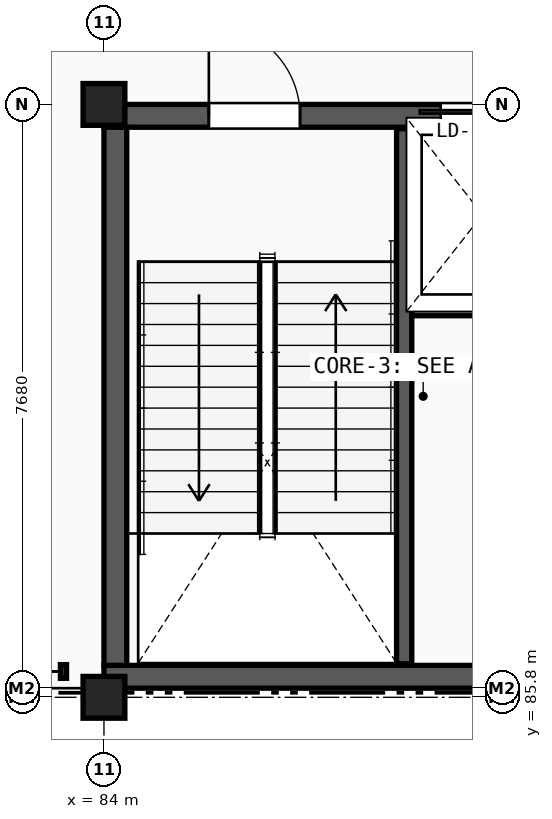
"""IFC4 building model, lengths in metres.
Left out: names, types, materials, properties, quantities, classifications, styles, units other than length and angle.
Written with IfcOpenShell. Run it as: python <this file> out.ifc"""

import sys

from ifc_helpers import new_model, si_unit, direction, frame, frame_2d, origin, origin_2d, place, context, subcontext, project, spatial, rectangle, circle, extrude, element, fill, save


model = new_model("IFC4")
c1 = context("Model", 3, precision=1e-05, world=origin(), true_north=direction((0.0, 1.0)))
c2 = subcontext(c1, "Body", "Model", "MODEL_VIEW")
j1 = project(units=[si_unit("LENGTHUNIT", "METRE"), si_unit("PLANEANGLEUNIT", "RADIAN")], contexts=[c1])
p1 = place(None, origin())
s1 = spatial("IfcSite", under=j1, at=p1, CompositionType="ELEMENT")
p2 = place(p1, origin())
s2 = spatial("IfcBuilding", under=s1, at=p2, CompositionType="ELEMENT")
p3 = place(p2, frame((0.0, 0.0, 5.1)))
s3 = spatial("IfcBuildingStorey", under=s2, at=p3, CompositionType="ELEMENT", Elevation=5.1)
for number, where, z_axis, x_axis in (
    (1, (84.0, 85.8, 0.0), (0.0, 0.0, 1.0), (1.0, 0.0, 0.0)),
    (2, (84.0, 93.6, 0.0), (0.0, 0.0, 1.0), (1.0, 0.0, 0.0)),
):
    element("IfcColumn", number, at=place(p3, frame(where, z_axis=z_axis, x_axis=x_axis)), inside=s3, PredefinedType="COLUMN", context=c2, shape_type="SweptSolid", body=[
        extrude(circle(Radius=0.275, at=origin_2d()), origin(), (0.0, 0.0, 1.0), 5.1),
    ])
p4 = place(p3, frame((84.0, 86.07, 0.0), z_axis=(0.0, 0.0, 1.0), x_axis=(1.0, 0.0, 0.0)))
e3 = element("IfcWall", 3, at=p4, inside=s3, PredefinedType="SHEAR", context=c2, shape_type="SweptSolid", body=[
    extrude(rectangle(XDim=8.4, YDim=0.3, at=frame_2d((4.2, 0.0))), origin(), (0.0, 0.0, 1.0), 4.85),
])
p5 = place(p3, frame((84.0, 93.45, 0.0), z_axis=(0.0, 0.0, 1.0), x_axis=(1.0, 0.0, 0.0)))
e4 = element("IfcWall", 4, at=p5, inside=s3, PredefinedType="SHEAR", context=c2, shape_type="SweptSolid", body=[
    extrude(rectangle(XDim=8.4, YDim=0.3, at=frame_2d((4.2, 0.0))), origin(), (0.0, 0.0, 1.0), 4.85),
])
p6 = place(p5, frame((1.38, 0.0, 0.0)))
e5 = element("IfcOpeningElement", 5, at=p6, cuts=e4, PredefinedType="OPENING", context=c2, shape_type="SweptSolid", body=[
    extrude(rectangle(XDim=1.2, YDim=2.15, at=frame_2d((0.6, 1.075))), frame((0.0, 0.16, 0.0), z_axis=(0.0, -1.0, 0.0), x_axis=(1.0, 0.0, 0.0)), (0.0, 0.0, 1.0), 0.32),
])
p7 = place(p5, frame((4.43, 0.0, 0.0)))
e6 = element("IfcOpeningElement", 6, at=p7, cuts=e4, PredefinedType="OPENING", context=c2, shape_type="SweptSolid", body=[
    extrude(rectangle(XDim=1.1, YDim=2.15, at=frame_2d((0.55, 1.075))), frame((0.0, 0.16, 0.0), z_axis=(0.0, -1.0, 0.0), x_axis=(1.0, 0.0, 0.0)), (0.0, 0.0, 1.0), 0.32),
])
p8 = place(p5, frame((6.4, 0.0, 0.0)))
e7 = element("IfcOpeningElement", 7, at=p8, cuts=e4, PredefinedType="OPENING", context=c2, shape_type="SweptSolid", body=[
    extrude(rectangle(XDim=1.4, YDim=2.2, at=frame_2d((0.7, 1.1))), frame((0.0, 0.16, 0.0), z_axis=(0.0, -1.0, 0.0), x_axis=(1.0, 0.0, 0.0)), (0.0, 0.0, 1.0), 0.32),
])
p9 = place(p3, frame((84.15, 86.22, 0.0), z_axis=(0.0, 0.0, 1.0), x_axis=(0.0, 1.0, 0.0)))
e8 = element("IfcWall", 8, at=p9, inside=s3, PredefinedType="SHEAR", context=c2, shape_type="SweptSolid", body=[
    extrude(rectangle(XDim=7.08, YDim=0.3, at=frame_2d((3.54, 0.0))), origin(), (0.0, 0.0, 1.0), 4.85),
])
p10 = place(p3, frame((87.95, 86.24, 0.0), z_axis=(0.0, 0.0, 1.0), x_axis=(0.0, 1.0, 0.0)))
e9 = element("IfcWall", 9, at=p10, inside=s3, PredefinedType="SHEAR", context=c2, shape_type="SweptSolid", body=[
    extrude(rectangle(XDim=7.04, YDim=0.2, at=frame_2d((3.52, 0.0))), origin(), (0.0, 0.0, 1.0), 4.85),
])
p11 = place(p3, frame((88.05, 90.92, 0.0), z_axis=(0.0, 0.0, 1.0), x_axis=(1.0, 0.0, 0.0)))
e10 = element("IfcWall", 10, at=p11, inside=s3, PredefinedType="PARTITIONING", context=c2, shape_type="SweptSolid", body=[
    extrude(rectangle(XDim=1.86, YDim=0.2, at=frame_2d((0.93, 0.0))), origin(), (0.0, 0.0, 1.0), 4.34),
])
p12 = place(p6, origin())
e11 = element("IfcDoor", 11, at=p12, inside=s3, OperationType="SINGLE_SWING_LEFT", PredefinedType="DOOR", context=c2, shape_type="SweptSolid", body=[
    extrude(rectangle(XDim=1.2, YDim=2.15, at=frame_2d((0.6, 1.075))), frame((0.0, 0.025, 0.0), z_axis=(0.0, -1.0, 0.0), x_axis=(1.0, 0.0, 0.0)), (0.0, 0.0, 1.0), 0.05),
])
fill(e5, e11)
p13 = place(p7, origin())
e12 = element("IfcDoor", 12, at=p13, inside=s3, OperationType="DOUBLE_DOOR_SLIDING", PredefinedType="DOOR", context=c2, shape_type="SweptSolid", body=[
    extrude(rectangle(XDim=1.1, YDim=2.15, at=frame_2d((0.55, 1.075))), frame((0.0, 0.025, 0.0), z_axis=(0.0, -1.0, 0.0), x_axis=(1.0, 0.0, 0.0)), (0.0, 0.0, 1.0), 0.05),
])
fill(e6, e12)
save(model, sys.argv[1])
